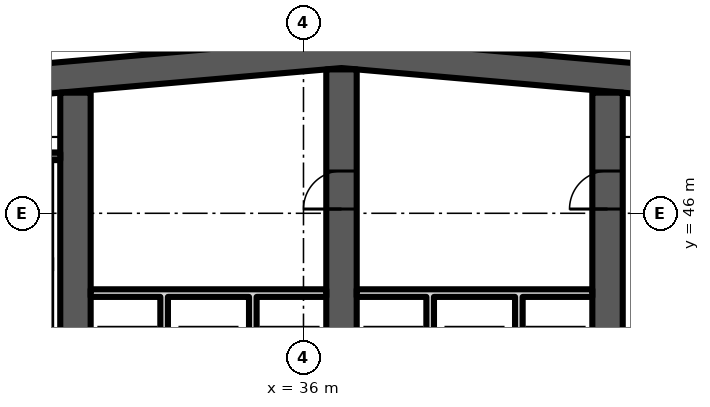
"""IFC4 building model, lengths in metres.
Left out: names, types, materials, properties, quantities, classifications, styles, units other than length and angle.
Written with IfcOpenShell. Run it as: python <this file> out.ifc"""

import sys

from ifc_helpers import new_model, si_unit, direction, frame, frame_2d, origin, place, context, subcontext, project, spatial, polyline, rectangle, outline, extrude, element, fill, save


model = new_model("IFC4")
c1 = context("Model", 3, precision=1e-05, world=origin(), true_north=direction((0.0, 1.0)))
c2 = subcontext(c1, "Body", "Model", "MODEL_VIEW")
j1 = project(units=[si_unit("LENGTHUNIT", "METRE"), si_unit("PLANEANGLEUNIT", "RADIAN")], contexts=[c1])
p1 = place(None, origin())
s1 = spatial("IfcSite", under=j1, at=p1, CompositionType="ELEMENT")
p2 = place(p1, origin())
s2 = spatial("IfcBuilding", under=s1, at=p2, CompositionType="ELEMENT")
p3 = place(p2, frame((0.0, 0.0, 177.1)))
s3 = spatial("IfcBuildingStorey", under=s2, at=p3, CompositionType="ELEMENT", Elevation=177.1)
p4 = place(p3, frame((0.0, 0.0, -0.0)))
e1 = element("IfcWall", 1, at=p4, inside=s3, PredefinedType="SHEAR", context=c2, shape_type="SweptSolid", body=[
    extrude(outline(polyline([(16.0, 47.984), (37.0, 49.822), (58.0, 47.984), (58.0, 48.787), (37.0, 50.625), (16.0, 48.787), (16.0, 47.984)])), origin(), (0.0, 0.0, 1.0), 3.6),
])
p5 = place(p3, frame((30.0, 34.8, 0.0), z_axis=(0.0, 0.0, 1.0), x_axis=(0.0, 1.0, 0.0)))
e2 = element("IfcWall", 2, at=p5, inside=s3, PredefinedType="SHEAR", context=c2, shape_type="SweptSolid", body=[
    extrude(rectangle(XDim=14.374, YDim=0.8, at=frame_2d((7.187, 0.0))), origin(), (0.0, 0.0, 1.0), 3.6),
])
p6 = place(p5, frame((3.6, 0.0, 0.0)))
e3 = element("IfcOpeningElement", 3, at=p6, cuts=e2, PredefinedType="OPENING", context=c2, shape_type="SweptSolid", body=[
    extrude(rectangle(XDim=1.1, YDim=2.1, at=frame_2d((0.55, 1.05))), frame((0.0, 0.41, 0.0), z_axis=(0.0, -1.0, 0.0), x_axis=(1.0, 0.0, 0.0)), (0.0, 0.0, 1.0), 0.82),
])
p7 = place(p3, frame((37.0, 34.8, 0.0), z_axis=(0.0, 0.0, 1.0), x_axis=(0.0, 1.0, 0.0)))
e4 = element("IfcWall", 4, at=p7, inside=s3, PredefinedType="SHEAR", context=c2, shape_type="SweptSolid", body=[
    extrude(rectangle(XDim=14.987, YDim=0.8, at=frame_2d((7.493, 0.0))), origin(), (0.0, 0.0, 1.0), 3.6),
])
p8 = place(p7, frame((11.312, 0.0, 0.0)))
e5 = element("IfcOpeningElement", 5, at=p8, cuts=e4, PredefinedType="OPENING", context=c2, shape_type="SweptSolid", body=[
    extrude(rectangle(XDim=1.0, YDim=2.1, at=frame_2d((0.5, 1.05))), frame((0.0, 0.41, 0.0), z_axis=(0.0, -1.0, 0.0), x_axis=(1.0, 0.0, 0.0)), (0.0, 0.0, 1.0), 0.82),
])
p9 = place(p7, frame((3.6, 0.0, 0.0)))
e6 = element("IfcOpeningElement", 6, at=p9, cuts=e4, PredefinedType="OPENING", context=c2, shape_type="SweptSolid", body=[
    extrude(rectangle(XDim=1.1, YDim=2.1, at=frame_2d((0.55, 1.05))), frame((0.0, 0.41, 0.0), z_axis=(0.0, -1.0, 0.0), x_axis=(1.0, 0.0, 0.0)), (0.0, 0.0, 1.0), 0.82),
])
p10 = place(p3, frame((44.0, 34.8, 0.0), z_axis=(0.0, 0.0, 1.0), x_axis=(0.0, 1.0, 0.0)))
e7 = element("IfcWall", 7, at=p10, inside=s3, PredefinedType="SHEAR", context=c2, shape_type="SweptSolid", body=[
    extrude(rectangle(XDim=14.374, YDim=0.8, at=frame_2d((7.187, 0.0))), origin(), (0.0, 0.0, 1.0), 3.6),
])
p11 = place(p10, frame((11.312, 0.0, 0.0)))
e8 = element("IfcOpeningElement", 8, at=p11, cuts=e7, PredefinedType="OPENING", context=c2, shape_type="SweptSolid", body=[
    extrude(rectangle(XDim=1.0, YDim=2.1, at=frame_2d((0.5, 1.05))), frame((0.0, 0.41, 0.0), z_axis=(0.0, -1.0, 0.0), x_axis=(1.0, 0.0, 0.0)), (0.0, 0.0, 1.0), 0.82),
])
p12 = place(p10, frame((3.6, 0.0, 0.0)))
e9 = element("IfcOpeningElement", 9, at=p12, cuts=e7, PredefinedType="OPENING", context=c2, shape_type="SweptSolid", body=[
    extrude(rectangle(XDim=1.1, YDim=2.1, at=frame_2d((0.55, 1.05))), frame((0.0, 0.41, 0.0), z_axis=(0.0, -1.0, 0.0), x_axis=(1.0, 0.0, 0.0)), (0.0, 0.0, 1.0), 0.82),
])
p13 = place(p3, frame((25.75, 47.5, 0.0), z_axis=(0.0, 0.0, 1.0), x_axis=(1.0, 0.0, 0.0)))
e10 = element("IfcWall", 10, at=p13, inside=s3, PredefinedType="SHEAR", context=c2, shape_type="SweptSolid", body=[
    extrude(rectangle(XDim=3.85, YDim=0.2, at=frame_2d((1.925, 0.0))), origin(), (0.0, 0.0, 1.0), 3.2),
])
p14 = place(p3, frame((0.0, 0.0, -0.0)))
e11 = element("IfcWall", 11, at=p14, inside=s3, PredefinedType="PARTITIONING", context=c2, shape_type="SweptSolid", body=[
    extrude(outline(polyline([(32.433, 40.8), (32.233, 40.8), (32.233, 43.8), (30.4, 43.8), (30.4, 44.0), (36.6, 44.0), (36.6, 43.8), (34.767, 43.8), (34.767, 40.8), (34.567, 40.8), (34.567, 43.8), (32.433, 43.8), (32.433, 40.8)])), origin(), (0.0, 0.0, 1.0), 3.2),
])
p15 = place(p3, frame((0.0, 0.0, -0.0)))
e12 = element("IfcWall", 12, at=p15, inside=s3, PredefinedType="PARTITIONING", context=c2, shape_type="SweptSolid", body=[
    extrude(outline(polyline([(39.433, 40.8), (39.233, 40.8), (39.233, 43.8), (37.4, 43.8), (37.4, 44.0), (43.6, 44.0), (43.6, 43.8), (41.767, 43.8), (41.767, 40.8), (41.567, 40.8), (41.567, 43.8), (39.433, 43.8), (39.433, 40.8)])), origin(), (0.0, 0.0, 1.0), 3.2),
])
p16 = place(p8, origin())
e13 = element("IfcDoor", 13, at=p16, inside=s3, OperationType="SINGLE_SWING_LEFT", PredefinedType="DOOR", context=c2, shape_type="SweptSolid", body=[
    extrude(rectangle(XDim=1.0, YDim=2.1, at=frame_2d((0.5, 1.05))), frame((0.0, 0.4, 0.0), z_axis=(0.0, -1.0, 0.0), x_axis=(1.0, 0.0, 0.0)), (0.0, 0.0, 1.0), 0.8),
])
fill(e5, e13)
p17 = place(p11, origin())
e14 = element("IfcDoor", 14, at=p17, inside=s3, OperationType="SINGLE_SWING_LEFT", PredefinedType="DOOR", context=c2, shape_type="SweptSolid", body=[
    extrude(rectangle(XDim=1.0, YDim=2.1, at=frame_2d((0.5, 1.05))), frame((0.0, 0.4, 0.0), z_axis=(0.0, -1.0, 0.0), x_axis=(1.0, 0.0, 0.0)), (0.0, 0.0, 1.0), 0.8),
])
fill(e8, e14)
save(model, sys.argv[1])
